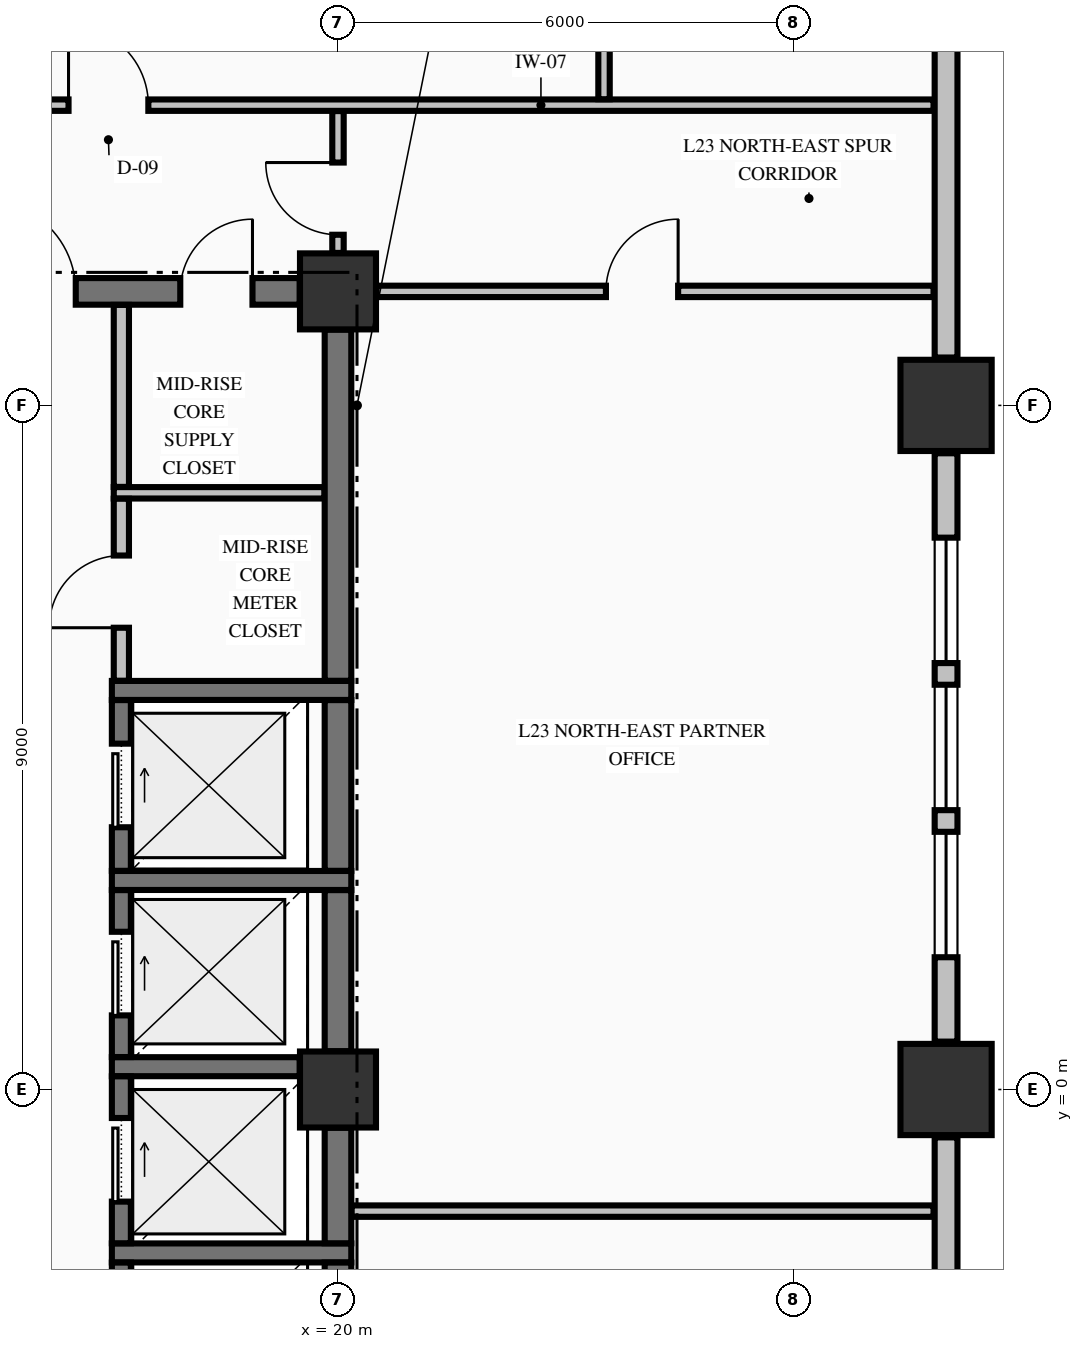
"""IFC4 building model, lengths in metres.
Left out: names, types, materials, properties, quantities, classifications, styles, units other than length and angle.
Written with IfcOpenShell. Run it as: python <this file> out.ifc"""

import sys

from ifc_helpers import new_model, si_unit, direction, frame, frame_2d, origin, origin_2d, place, context, subcontext, project, spatial, rectangle, extrude, element, fill, save


model = new_model("IFC4")
c1 = context("Model", 3, precision=1e-05, world=origin(), true_north=direction((0.0, 1.0)))
c2 = subcontext(c1, "Body", "Model", "MODEL_VIEW")
j1 = project(units=[si_unit("LENGTHUNIT", "METRE"), si_unit("PLANEANGLEUNIT", "RADIAN")], contexts=[c1])
p1 = place(None, origin())
s1 = spatial("IfcSite", under=j1, at=p1, CompositionType="ELEMENT")
p2 = place(p1, origin())
s2 = spatial("IfcBuilding", under=s1, at=p2, CompositionType="ELEMENT")
p3 = place(p2, frame((0.0, 0.0, 94.93)))
s3 = spatial("IfcBuildingStorey", under=s2, at=p3, CompositionType="ELEMENT", Elevation=94.93)
for number, where, z_axis, x_axis in (
    (1, (28.0, 0.0, -0.25), (0.0, 0.0, 1.0), (1.0, 0.0, 0.0)),
    (2, (28.0, 9.0, -0.25), (0.0, 0.0, 1.0), (1.0, 0.0, 0.0)),
):
    element("IfcColumn", number, at=place(p3, frame(where, z_axis=z_axis, x_axis=x_axis)), inside=s3, PredefinedType="COLUMN", context=c2, shape_type="SweptSolid", body=[
        extrude(rectangle(XDim=1.2, YDim=1.2, at=origin_2d()), origin(), (0.0, 0.0, 1.0), 3.545),
    ])
for number, where, z_axis, x_axis in (
    (3, (20.0, 10.5, -0.25), (0.0, 0.0, 1.0), (1.0, 0.0, 0.0)),
    (4, (20.0, 0.0, -0.25), (0.0, 0.0, 1.0), (1.0, 0.0, 0.0)),
):
    element("IfcColumn", number, at=place(p3, frame(where, z_axis=z_axis, x_axis=x_axis)), inside=s3, PredefinedType="COLUMN", context=c2, shape_type="SweptSolid", body=[
        extrude(rectangle(XDim=1.0, YDim=1.0, at=origin_2d()), origin(), (0.0, 0.0, 1.0), 3.545),
    ])
p4 = place(p3, frame((28.0, -8.37, 0.0), z_axis=(0.0, 0.0, 1.0), x_axis=(0.0, 1.0, 0.0)))
e5 = element("IfcWall", 5, at=p4, inside=s3, PredefinedType="STANDARD", context=c2, shape_type="SweptSolid", body=[
    extrude(rectangle(XDim=7.74, YDim=0.3, at=frame_2d((3.87, 0.0))), origin(), (0.0, 0.0, 1.0), 2.687),
])
p5 = place(p4, frame((1.11, 0.0, 0.8)))
e6 = element("IfcOpeningElement", 6, at=p5, cuts=e5, PredefinedType="OPENING", context=c2, shape_type="SweptSolid", body=[
    extrude(rectangle(XDim=1.65, YDim=1.7, at=frame_2d((0.825, 0.85))), frame((0.0, 0.16, 0.0), z_axis=(0.0, -1.0, 0.0), x_axis=(1.0, 0.0, 0.0)), (0.0, 0.0, 1.0), 0.32),
])
p6 = place(p4, frame((3.045, 0.0, 0.8)))
e7 = element("IfcOpeningElement", 7, at=p6, cuts=e5, PredefinedType="OPENING", context=c2, shape_type="SweptSolid", body=[
    extrude(rectangle(XDim=1.65, YDim=1.7, at=frame_2d((0.825, 0.85))), frame((0.0, 0.16, 0.0), z_axis=(0.0, -1.0, 0.0), x_axis=(1.0, 0.0, 0.0)), (0.0, 0.0, 1.0), 0.32),
])
p7 = place(p3, frame((28.0, 0.63, 0.0), z_axis=(0.0, 0.0, 1.0), x_axis=(0.0, 1.0, 0.0)))
e8 = element("IfcWall", 8, at=p7, inside=s3, PredefinedType="STANDARD", context=c2, shape_type="SweptSolid", body=[
    extrude(rectangle(XDim=7.74, YDim=0.3, at=frame_2d((3.87, 0.0))), origin(), (0.0, 0.0, 1.0), 2.687),
])
p8 = place(p7, frame((1.11, 0.0, 0.8)))
e9 = element("IfcOpeningElement", 9, at=p8, cuts=e8, PredefinedType="OPENING", context=c2, shape_type="SweptSolid", body=[
    extrude(rectangle(XDim=1.65, YDim=1.7, at=frame_2d((0.825, 0.85))), frame((0.0, 0.16, 0.0), z_axis=(0.0, -1.0, 0.0), x_axis=(1.0, 0.0, 0.0)), (0.0, 0.0, 1.0), 0.32),
])
p9 = place(p7, frame((3.045, 0.0, 0.8)))
e10 = element("IfcOpeningElement", 10, at=p9, cuts=e8, PredefinedType="OPENING", context=c2, shape_type="SweptSolid", body=[
    extrude(rectangle(XDim=1.65, YDim=1.7, at=frame_2d((0.825, 0.85))), frame((0.0, 0.16, 0.0), z_axis=(0.0, -1.0, 0.0), x_axis=(1.0, 0.0, 0.0)), (0.0, 0.0, 1.0), 0.32),
])
p10 = place(p7, frame((4.98, 0.0, 0.8)))
e11 = element("IfcOpeningElement", 11, at=p10, cuts=e8, PredefinedType="OPENING", context=c2, shape_type="SweptSolid", body=[
    extrude(rectangle(XDim=1.65, YDim=1.7, at=frame_2d((0.825, 0.85))), frame((0.0, 0.16, 0.0), z_axis=(0.0, -1.0, 0.0), x_axis=(1.0, 0.0, 0.0)), (0.0, 0.0, 1.0), 0.32),
])
p11 = place(p3, frame((28.0, 9.63, 0.0), z_axis=(0.0, 0.0, 1.0), x_axis=(0.0, 1.0, 0.0)))
e12 = element("IfcWall", 12, at=p11, inside=s3, PredefinedType="STANDARD", context=c2, shape_type="SweptSolid", body=[
    extrude(rectangle(XDim=10.74, YDim=0.3, at=frame_2d((5.37, 0.0))), origin(), (0.0, 0.0, 1.0), 2.687),
])
p12 = place(p3, frame((17.025, -2.15, 0.0), z_axis=(0.0, 0.0, 1.0), x_axis=(1.0, 0.0, 0.0)))
e13 = element("IfcWall", 13, at=p12, inside=s3, PredefinedType="SOLIDWALL", context=c2, shape_type="SweptSolid", body=[
    extrude(rectangle(XDim=3.15, YDim=0.25, at=frame_2d((1.575, 0.0))), origin(), (0.0, 0.0, 1.0), 3.295),
])
p13 = place(p3, frame((17.025, 0.3, 0.0), z_axis=(0.0, 0.0, 1.0), x_axis=(1.0, 0.0, 0.0)))
e14 = element("IfcWall", 14, at=p13, inside=s3, PredefinedType="SOLIDWALL", context=c2, shape_type="SweptSolid", body=[
    extrude(rectangle(XDim=2.471, YDim=0.25, at=frame_2d((1.236, 0.0))), origin(), (0.0, 0.0, 1.0), 3.295),
])
for number, where, z_axis, x_axis in (
    (15, (17.025, 2.75, 0.0), (0.0, 0.0, 1.0), (1.0, 0.0, 0.0)),
    (16, (17.025, 5.25, 0.0), (0.0, 0.0, 1.0), (1.0, 0.0, 0.0)),
):
    element("IfcWall", number, at=place(p3, frame(where, z_axis=z_axis, x_axis=x_axis)), inside=s3, PredefinedType="SOLIDWALL", context=c2, shape_type="SweptSolid", body=[
        extrude(rectangle(XDim=3.15, YDim=0.25, at=frame_2d((1.575, 0.0))), origin(), (0.0, 0.0, 1.0), 3.295),
    ])
p14 = place(p3, frame((14.7, 10.5, 0.0), z_axis=(0.0, 0.0, 1.0), x_axis=(1.0, 0.0, 0.0)))
e17 = element("IfcWall", 17, at=p14, inside=s3, PredefinedType="SHEAR", context=c2, shape_type="SweptSolid", body=[
    extrude(rectangle(XDim=4.796, YDim=0.35, at=frame_2d((2.398, 0.0))), origin(), (0.0, 0.0, 1.0), 3.295),
])
p15 = place(p14, frame((0.65, 0.0, 0.0)))
e18 = element("IfcOpeningElement", 18, at=p15, cuts=e17, PredefinedType="OPENING", context=c2, shape_type="SweptSolid", body=[
    extrude(rectangle(XDim=1.2, YDim=2.15, at=frame_2d((0.6, 1.075))), frame((0.0, 0.185, 0.0), z_axis=(0.0, -1.0, 0.0), x_axis=(1.0, 0.0, 0.0)), (0.0, 0.0, 1.0), 0.37),
])
p16 = place(p14, frame((3.225, 0.0, 0.0)))
e19 = element("IfcOpeningElement", 19, at=p16, cuts=e17, PredefinedType="OPENING", context=c2, shape_type="SweptSolid", body=[
    extrude(rectangle(XDim=0.95, YDim=2.15, at=frame_2d((0.475, 1.075))), frame((0.0, 0.185, 0.0), z_axis=(0.0, -1.0, 0.0), x_axis=(1.0, 0.0, 0.0)), (0.0, 0.0, 1.0), 0.37),
])
p17 = place(p3, frame((20.178, -1.6, 0.0), z_axis=(0.0, 0.0, 1.0), x_axis=(1.0, 0.0, 0.0)))
e20 = element("IfcWall", 20, at=p17, inside=s3, PredefinedType="PARTITIONING", context=c2, shape_type="SweptSolid", body=[
    extrude(rectangle(XDim=7.657, YDim=0.15, at=frame_2d((3.829, 0.0))), origin(), (0.0, 0.0, 1.0), 3.295),
])
p18 = place(p3, frame((17.05, 7.85, 0.0), z_axis=(0.0, 0.0, 1.0), x_axis=(1.0, 0.0, 0.0)))
e21 = element("IfcWall", 21, at=p18, inside=s3, PredefinedType="PARTITIONING", context=c2, shape_type="SweptSolid", body=[
    extrude(rectangle(XDim=2.772, YDim=0.15, at=frame_2d((1.386, 0.0))), origin(), (0.0, 0.0, 1.0), 3.295),
])
p19 = place(p3, frame((20.506, 10.5, 0.0), z_axis=(0.0, 0.0, 1.0), x_axis=(1.0, 0.0, 0.0)))
e22 = element("IfcWall", 22, at=p19, inside=s3, PredefinedType="PARTITIONING", context=c2, shape_type="SweptSolid", body=[
    extrude(rectangle(XDim=7.329, YDim=0.15, at=frame_2d((3.665, 0.0))), origin(), (0.0, 0.0, 1.0), 3.295),
])
p20 = place(p19, frame((3.019, 0.0, 0.0)))
e23 = element("IfcOpeningElement", 23, at=p20, cuts=e22, PredefinedType="OPENING", context=c2, shape_type="SweptSolid", body=[
    extrude(rectangle(XDim=0.95, YDim=2.15, at=frame_2d((0.475, 1.075))), frame((0.0, 0.085, 0.0), z_axis=(0.0, -1.0, 0.0), x_axis=(1.0, 0.0, 0.0)), (0.0, 0.0, 1.0), 0.17),
])
p21 = place(p3, frame((-22.835, 12.95, 0.0), z_axis=(0.0, 0.0, 1.0), x_axis=(1.0, 0.0, 0.0)))
e24 = element("IfcWall", 24, at=p21, inside=s3, PredefinedType="PARTITIONING", context=c2, shape_type="SweptSolid", body=[
    extrude(rectangle(XDim=50.67, YDim=0.15, at=frame_2d((25.335, 0.0))), origin(), (0.0, 0.0, 1.0), 3.295),
])
p22 = place(p21, frame((8.13, 0.0, 0.0)))
e25 = element("IfcOpeningElement", 25, at=p22, cuts=e24, PredefinedType="OPENING", context=c2, shape_type="SweptSolid", body=[
    extrude(rectangle(XDim=1.05, YDim=2.15, at=frame_2d((0.525, 1.075))), frame((0.0, 0.085, 0.0), z_axis=(0.0, -1.0, 0.0), x_axis=(1.0, 0.0, 0.0)), (0.0, 0.0, 1.0), 0.17),
])
p23 = place(p21, frame((15.41, 0.0, 0.0)))
e26 = element("IfcOpeningElement", 26, at=p23, cuts=e24, PredefinedType="OPENING", context=c2, shape_type="SweptSolid", body=[
    extrude(rectangle(XDim=0.95, YDim=2.15, at=frame_2d((0.475, 1.075))), frame((0.0, 0.085, 0.0), z_axis=(0.0, -1.0, 0.0), x_axis=(1.0, 0.0, 0.0)), (0.0, 0.0, 1.0), 0.17),
])
p24 = place(p21, frame((22.66, 0.0, 0.0)))
e27 = element("IfcOpeningElement", 27, at=p24, cuts=e24, PredefinedType="OPENING", context=c2, shape_type="SweptSolid", body=[
    extrude(rectangle(XDim=0.95, YDim=2.15, at=frame_2d((0.475, 1.075))), frame((0.0, 0.085, 0.0), z_axis=(0.0, -1.0, 0.0), x_axis=(1.0, 0.0, 0.0)), (0.0, 0.0, 1.0), 0.17),
])
p25 = place(p21, frame((27.41, 0.0, 0.0)))
e28 = element("IfcOpeningElement", 28, at=p25, cuts=e24, PredefinedType="OPENING", context=c2, shape_type="SweptSolid", body=[
    extrude(rectangle(XDim=0.95, YDim=2.15, at=frame_2d((0.475, 1.075))), frame((0.0, 0.085, 0.0), z_axis=(0.0, -1.0, 0.0), x_axis=(1.0, 0.0, 0.0)), (0.0, 0.0, 1.0), 0.17),
])
p26 = place(p21, frame((32.16, 0.0, 0.0)))
e29 = element("IfcOpeningElement", 29, at=p26, cuts=e24, PredefinedType="OPENING", context=c2, shape_type="SweptSolid", body=[
    extrude(rectangle(XDim=0.95, YDim=2.15, at=frame_2d((0.475, 1.075))), frame((0.0, 0.085, 0.0), z_axis=(0.0, -1.0, 0.0), x_axis=(1.0, 0.0, 0.0)), (0.0, 0.0, 1.0), 0.17),
])
p27 = place(p21, frame((39.29, 0.0, 0.0)))
e30 = element("IfcOpeningElement", 30, at=p27, cuts=e24, PredefinedType="OPENING", context=c2, shape_type="SweptSolid", body=[
    extrude(rectangle(XDim=1.05, YDim=2.15, at=frame_2d((0.525, 1.075))), frame((0.0, 0.085, 0.0), z_axis=(0.0, -1.0, 0.0), x_axis=(1.0, 0.0, 0.0)), (0.0, 0.0, 1.0), 0.17),
])
p28 = place(p3, frame((17.15, -4.423, 0.0), z_axis=(0.0, 0.0, 1.0), x_axis=(0.0, 1.0, 0.0)))
e31 = element("IfcWall", 31, at=p28, inside=s3, PredefinedType="SOLIDWALL", context=c2, shape_type="SweptSolid", body=[
    extrude(rectangle(XDim=2.146, YDim=0.25, at=frame_2d((1.073, 0.0))), origin(), (0.0, 0.0, 1.0), 3.295),
])
p29 = place(p28, frame((0.523, 0.0, 0.0)))
e32 = element("IfcOpeningElement", 32, at=p29, cuts=e31, PredefinedType="OPENING", context=c2, shape_type="SweptSolid", body=[
    extrude(rectangle(XDim=1.1, YDim=2.2, at=frame_2d((0.55, 1.1))), frame((0.0, 0.135, 0.0), z_axis=(0.0, -1.0, 0.0), x_axis=(1.0, 0.0, 0.0)), (0.0, 0.0, 1.0), 0.27),
])
p30 = place(p3, frame((17.15, -2.023, 0.0), z_axis=(0.0, 0.0, 1.0), x_axis=(0.0, 1.0, 0.0)))
e33 = element("IfcWall", 33, at=p30, inside=s3, PredefinedType="SOLIDWALL", context=c2, shape_type="SweptSolid", body=[
    extrude(rectangle(XDim=2.196, YDim=0.25, at=frame_2d((1.098, 0.0))), origin(), (0.0, 0.0, 1.0), 3.295),
])
p31 = place(p30, frame((0.548, 0.0, 0.0)))
e34 = element("IfcOpeningElement", 34, at=p31, cuts=e33, PredefinedType="OPENING", context=c2, shape_type="SweptSolid", body=[
    extrude(rectangle(XDim=1.1, YDim=2.2, at=frame_2d((0.55, 1.1))), frame((0.0, 0.135, 0.0), z_axis=(0.0, -1.0, 0.0), x_axis=(1.0, 0.0, 0.0)), (0.0, 0.0, 1.0), 0.27),
])
p32 = place(p3, frame((17.15, 0.427, 0.0), z_axis=(0.0, 0.0, 1.0), x_axis=(0.0, 1.0, 0.0)))
e35 = element("IfcWall", 35, at=p32, inside=s3, PredefinedType="SOLIDWALL", context=c2, shape_type="SweptSolid", body=[
    extrude(rectangle(XDim=2.196, YDim=0.25, at=frame_2d((1.098, 0.0))), origin(), (0.0, 0.0, 1.0), 3.295),
])
p33 = place(p32, frame((0.548, 0.0, 0.0)))
e36 = element("IfcOpeningElement", 36, at=p33, cuts=e35, PredefinedType="OPENING", context=c2, shape_type="SweptSolid", body=[
    extrude(rectangle(XDim=1.1, YDim=2.2, at=frame_2d((0.55, 1.1))), frame((0.0, 0.135, 0.0), z_axis=(0.0, -1.0, 0.0), x_axis=(1.0, 0.0, 0.0)), (0.0, 0.0, 1.0), 0.27),
])
p34 = place(p3, frame((17.15, 2.877, 0.0), z_axis=(0.0, 0.0, 1.0), x_axis=(0.0, 1.0, 0.0)))
e37 = element("IfcWall", 37, at=p34, inside=s3, PredefinedType="SOLIDWALL", context=c2, shape_type="SweptSolid", body=[
    extrude(rectangle(XDim=2.246, YDim=0.25, at=frame_2d((1.123, 0.0))), origin(), (0.0, 0.0, 1.0), 3.295),
])
p35 = place(p34, frame((0.573, 0.0, 0.0)))
e38 = element("IfcOpeningElement", 38, at=p35, cuts=e37, PredefinedType="OPENING", context=c2, shape_type="SweptSolid", body=[
    extrude(rectangle(XDim=1.1, YDim=2.2, at=frame_2d((0.55, 1.1))), frame((0.0, 0.135, 0.0), z_axis=(0.0, -1.0, 0.0), x_axis=(1.0, 0.0, 0.0)), (0.0, 0.0, 1.0), 0.27),
])
p36 = place(p3, frame((20.0, -4.423, 0.0), z_axis=(0.0, 0.0, 1.0), x_axis=(0.0, 1.0, 0.0)))
e39 = element("IfcWall", 39, at=p36, inside=s3, PredefinedType="SHEAR", context=c2, shape_type="SweptSolid", body=[
    extrude(rectangle(XDim=2.146, YDim=0.35, at=frame_2d((1.073, 0.0))), origin(), (0.0, 0.0, 1.0), 3.295),
])
p37 = place(p3, frame((20.0, -2.023, 0.0), z_axis=(0.0, 0.0, 1.0), x_axis=(0.0, 1.0, 0.0)))
e40 = element("IfcWall", 40, at=p37, inside=s3, PredefinedType="SHEAR", context=c2, shape_type="SweptSolid", body=[
    extrude(rectangle(XDim=1.519, YDim=0.35, at=frame_2d((0.76, 0.0))), origin(), (0.0, 0.0, 1.0), 3.295),
])
p38 = place(p3, frame((20.0, 0.504, 0.0), z_axis=(0.0, 0.0, 1.0), x_axis=(0.0, 1.0, 0.0)))
e41 = element("IfcWall", 41, at=p38, inside=s3, PredefinedType="SHEAR", context=c2, shape_type="SweptSolid", body=[
    extrude(rectangle(XDim=2.119, YDim=0.35, at=frame_2d((1.06, 0.0))), origin(), (0.0, 0.0, 1.0), 3.295),
])
p39 = place(p3, frame((20.0, 2.877, 0.0), z_axis=(0.0, 0.0, 1.0), x_axis=(0.0, 1.0, 0.0)))
e42 = element("IfcWall", 42, at=p39, inside=s3, PredefinedType="SHEAR", context=c2, shape_type="SweptSolid", body=[
    extrude(rectangle(XDim=2.246, YDim=0.35, at=frame_2d((1.123, 0.0))), origin(), (0.0, 0.0, 1.0), 3.295),
])
p40 = place(p3, frame((20.0, 5.377, 0.0), z_axis=(0.0, 0.0, 1.0), x_axis=(0.0, 1.0, 0.0)))
e43 = element("IfcWall", 43, at=p40, inside=s3, PredefinedType="SHEAR", context=c2, shape_type="SweptSolid", body=[
    extrude(rectangle(XDim=4.619, YDim=0.35, at=frame_2d((2.31, 0.0))), origin(), (0.0, 0.0, 1.0), 3.295),
])
p41 = place(p3, frame((17.15, 5.378, 0.0), z_axis=(0.0, 0.0, 1.0), x_axis=(0.0, 1.0, 0.0)))
e44 = element("IfcWall", 44, at=p41, inside=s3, PredefinedType="PARTITIONING", context=c2, shape_type="SweptSolid", body=[
    extrude(rectangle(XDim=2.394, YDim=0.2, at=frame_2d((1.197, 0.0))), origin(), (0.0, 0.0, 1.0), 3.295),
])
p42 = place(p41, frame((0.697, 0.0, 0.0)))
e45 = element("IfcOpeningElement", 45, at=p42, cuts=e44, PredefinedType="OPENING", context=c2, shape_type="SweptSolid", body=[
    extrude(rectangle(XDim=0.95, YDim=2.15, at=frame_2d((0.475, 1.075))), frame((0.0, 0.11, 0.0), z_axis=(0.0, -1.0, 0.0), x_axis=(1.0, 0.0, 0.0)), (0.0, 0.0, 1.0), 0.22),
])
p43 = place(p3, frame((17.15, 7.928, 0.0), z_axis=(0.0, 0.0, 1.0), x_axis=(0.0, 1.0, 0.0)))
e46 = element("IfcWall", 46, at=p43, inside=s3, PredefinedType="PARTITIONING", context=c2, shape_type="SweptSolid", body=[
    extrude(rectangle(XDim=2.394, YDim=0.2, at=frame_2d((1.197, 0.0))), origin(), (0.0, 0.0, 1.0), 3.295),
])
p44 = place(p3, frame((20.0, 11.006, 0.0), z_axis=(0.0, 0.0, 1.0), x_axis=(0.0, 1.0, 0.0)))
e47 = element("IfcWall", 47, at=p44, inside=s3, PredefinedType="PARTITIONING", context=c2, shape_type="SweptSolid", body=[
    extrude(rectangle(XDim=1.866, YDim=0.15, at=frame_2d((0.933, 0.0))), origin(), (0.0, 0.0, 1.0), 2.785),
])
p45 = place(p44, frame((0.239, 0.0, 0.0)))
e48 = element("IfcOpeningElement", 48, at=p45, cuts=e47, PredefinedType="OPENING", context=c2, shape_type="SweptSolid", body=[
    extrude(rectangle(XDim=0.95, YDim=2.15, at=frame_2d((0.475, 1.075))), frame((0.0, 0.085, 0.0), z_axis=(0.0, -1.0, 0.0), x_axis=(1.0, 0.0, 0.0)), (0.0, 0.0, 1.0), 0.17),
])
p46 = place(p3, frame((23.5, 13.028, 0.0), z_axis=(0.0, 0.0, 1.0), x_axis=(0.0, 1.0, 0.0)))
e49 = element("IfcWall", 49, at=p46, inside=s3, PredefinedType="PARTITIONING", context=c2, shape_type="SweptSolid", body=[
    extrude(rectangle(XDim=7.366, YDim=0.15, at=frame_2d((3.683, 0.0))), origin(), (0.0, 0.0, 1.0), 3.295),
])
p47 = place(p8, origin())
e50 = element("IfcWindow", 50, at=p47, inside=s3, PartitioningType="SINGLE_PANEL", PredefinedType="WINDOW", context=c2, shape_type="SweptSolid", body=[
    extrude(rectangle(XDim=1.65, YDim=1.7, at=frame_2d((0.825, 0.85))), frame((0.0, 0.03, 0.0), z_axis=(0.0, -1.0, 0.0), x_axis=(1.0, 0.0, 0.0)), (0.0, 0.0, 1.0), 0.06),
])
fill(e9, e50)
p48 = place(p9, origin())
e51 = element("IfcWindow", 51, at=p48, inside=s3, PartitioningType="SINGLE_PANEL", PredefinedType="WINDOW", context=c2, shape_type="SweptSolid", body=[
    extrude(rectangle(XDim=1.65, YDim=1.7, at=frame_2d((0.825, 0.85))), frame((0.0, 0.03, 0.0), z_axis=(0.0, -1.0, 0.0), x_axis=(1.0, 0.0, 0.0)), (0.0, 0.0, 1.0), 0.06),
])
fill(e10, e51)
p49 = place(p10, origin())
e52 = element("IfcWindow", 52, at=p49, inside=s3, PartitioningType="SINGLE_PANEL", PredefinedType="WINDOW", context=c2, shape_type="SweptSolid", body=[
    extrude(rectangle(XDim=1.65, YDim=1.7, at=frame_2d((0.825, 0.85))), frame((0.0, 0.03, 0.0), z_axis=(0.0, -1.0, 0.0), x_axis=(1.0, 0.0, 0.0)), (0.0, 0.0, 1.0), 0.06),
])
fill(e11, e52)
p50 = place(p31, origin())
e53 = element("IfcDoor", 53, at=p50, inside=s3, OperationType="SLIDING_TO_RIGHT", PredefinedType="DOOR", context=c2, shape_type="SweptSolid", body=[
    extrude(rectangle(XDim=1.1, YDim=2.2, at=frame_2d((0.55, 1.1))), frame((0.0, 0.025, 0.0), z_axis=(0.0, -1.0, 0.0), x_axis=(1.0, 0.0, 0.0)), (0.0, 0.0, 1.0), 0.05),
])
fill(e34, e53)
p51 = place(p33, origin())
e54 = element("IfcDoor", 54, at=p51, inside=s3, OperationType="SLIDING_TO_RIGHT", PredefinedType="DOOR", context=c2, shape_type="SweptSolid", body=[
    extrude(rectangle(XDim=1.1, YDim=2.2, at=frame_2d((0.55, 1.1))), frame((0.0, 0.025, 0.0), z_axis=(0.0, -1.0, 0.0), x_axis=(1.0, 0.0, 0.0)), (0.0, 0.0, 1.0), 0.05),
])
fill(e36, e54)
p52 = place(p35, origin())
e55 = element("IfcDoor", 55, at=p52, inside=s3, OperationType="SLIDING_TO_RIGHT", PredefinedType="DOOR", context=c2, shape_type="SweptSolid", body=[
    extrude(rectangle(XDim=1.1, YDim=2.2, at=frame_2d((0.55, 1.1))), frame((0.0, 0.025, 0.0), z_axis=(0.0, -1.0, 0.0), x_axis=(1.0, 0.0, 0.0)), (0.0, 0.0, 1.0), 0.05),
])
fill(e38, e55)
p53 = place(p15, origin())
e56 = element("IfcDoor", 56, at=p53, inside=s3, OperationType="SINGLE_SWING_LEFT", PredefinedType="DOOR", context=c2, shape_type="SweptSolid", body=[
    extrude(rectangle(XDim=1.2, YDim=2.15, at=frame_2d((0.6, 1.075))), frame((0.0, 0.025, 0.0), z_axis=(0.0, -1.0, 0.0), x_axis=(1.0, 0.0, 0.0)), (0.0, 0.0, 1.0), 0.05),
])
fill(e18, e56)
p54 = place(p16, origin())
e57 = element("IfcDoor", 57, at=p54, inside=s3, OperationType="SINGLE_SWING_RIGHT", PredefinedType="DOOR", context=c2, shape_type="SweptSolid", body=[
    extrude(rectangle(XDim=0.95, YDim=2.15, at=frame_2d((0.475, 1.075))), frame((0.0, 0.025, 0.0), z_axis=(0.0, -1.0, 0.0), x_axis=(1.0, 0.0, 0.0)), (0.0, 0.0, 1.0), 0.05),
])
fill(e19, e57)
p55 = place(p42, origin())
e58 = element("IfcDoor", 58, at=p55, inside=s3, OperationType="SINGLE_SWING_LEFT", PredefinedType="DOOR", context=c2, shape_type="SweptSolid", body=[
    extrude(rectangle(XDim=0.95, YDim=2.15, at=frame_2d((0.475, 1.075))), frame((0.0, 0.025, 0.0), z_axis=(0.0, -1.0, 0.0), x_axis=(1.0, 0.0, 0.0)), (0.0, 0.0, 1.0), 0.05),
])
fill(e45, e58)
p56 = place(p27, origin())
e59 = element("IfcDoor", 59, at=p56, inside=s3, OperationType="SINGLE_SWING_LEFT", PredefinedType="DOOR", context=c2, shape_type="SweptSolid", body=[
    extrude(rectangle(XDim=1.05, YDim=2.15, at=frame_2d((0.525, 1.075))), frame((0.0, 0.025, 0.0), z_axis=(0.0, -1.0, 0.0), x_axis=(1.0, 0.0, 0.0)), (0.0, 0.0, 1.0), 0.05),
])
fill(e30, e59)
p57 = place(p45, origin())
e60 = element("IfcDoor", 60, at=p57, inside=s3, OperationType="SINGLE_SWING_RIGHT", PredefinedType="DOOR", context=c2, shape_type="SweptSolid", body=[
    extrude(rectangle(XDim=0.95, YDim=2.15, at=frame_2d((0.475, 1.075))), frame((0.0, 0.025, 0.0), z_axis=(0.0, -1.0, 0.0), x_axis=(1.0, 0.0, 0.0)), (0.0, 0.0, 1.0), 0.05),
])
fill(e48, e60)
p58 = place(p20, origin())
e61 = element("IfcDoor", 61, at=p58, inside=s3, OperationType="SINGLE_SWING_RIGHT", PredefinedType="DOOR", context=c2, shape_type="SweptSolid", body=[
    extrude(rectangle(XDim=0.95, YDim=2.15, at=frame_2d((0.475, 1.075))), frame((0.0, 0.025, 0.0), z_axis=(0.0, -1.0, 0.0), x_axis=(1.0, 0.0, 0.0)), (0.0, 0.0, 1.0), 0.05),
])
fill(e23, e61)
save(model, sys.argv[1])
